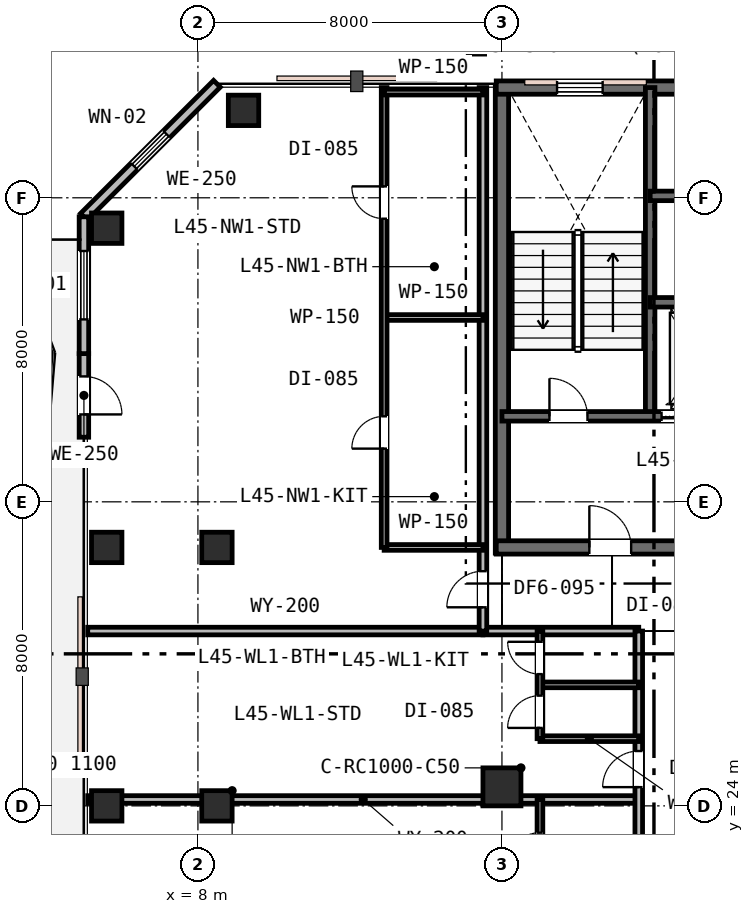
"""IFC4 building model, lengths in metres.
Left out: names, types, materials, properties, quantities, classifications, styles, units other than length and angle.
Written with IfcOpenShell. Run it as: python <this file> out.ifc"""

import sys

from ifc_helpers import new_model, si_unit, direction, frame, frame_2d, origin, origin_2d, place, context, subcontext, project, spatial, rectangle, extrude, element, fill, save


model = new_model("IFC4")
c1 = context("Model", 3, precision=1e-05, world=origin(), true_north=direction((0.0, 1.0)))
c2 = subcontext(c1, "Body", "Model", "MODEL_VIEW")
j1 = project(units=[si_unit("LENGTHUNIT", "METRE"), si_unit("PLANEANGLEUNIT", "RADIAN")], contexts=[c1])
p1 = place(None, origin())
s1 = spatial("IfcSite", under=j1, at=p1, CompositionType="ELEMENT")
p2 = place(p1, origin())
s2 = spatial("IfcBuilding", under=s1, at=p2, CompositionType="ELEMENT")
p3 = place(p2, frame((0.0, 0.0, 175.8)))
s3 = spatial("IfcBuildingStorey", under=s2, at=p3, CompositionType="ELEMENT", Elevation=175.8)
p4 = place(p3, frame((16.0, 30.65, 0.0), z_axis=(0.0, 0.0, 1.0), x_axis=(0.0, 1.0, 0.0)))
e1 = element("IfcWall", 1, at=p4, inside=s3, PredefinedType="SHEAR", context=c2, shape_type="SweptSolid", body=[
    extrude(rectangle(XDim=12.3, YDim=0.35, at=frame_2d((6.15, 0.0))), origin(), (0.0, 0.0, 1.0), 3.6),
])
p5 = place(p3, frame((15.85, 42.9, 0.0), z_axis=(0.0, 0.0, 1.0), x_axis=(1.0, 0.0, 0.0)))
e2 = element("IfcWall", 2, at=p5, inside=s3, PredefinedType="SHEAR", context=c2, shape_type="SweptSolid", body=[
    extrude(rectangle(XDim=24.3, YDim=0.35, at=frame_2d((12.15, 0.0))), origin(), (0.0, 0.0, 1.0), 3.6),
])
p6 = place(p5, frame((1.6, 0.0, 0.95)))
e3 = element("IfcOpeningElement", 3, at=p6, cuts=e2, PredefinedType="OPENING", context=c2, shape_type="SweptSolid", body=[
    extrude(rectangle(XDim=1.2, YDim=1.6, at=frame_2d((0.6, 0.8))), frame((0.0, 0.185, 0.0), z_axis=(0.0, -1.0, 0.0), x_axis=(1.0, 0.0, 0.0)), (0.0, 0.0, 1.0), 0.37),
])
p7 = place(p5, frame((16.5, 0.0, 0.95)))
e4 = element("IfcOpeningElement", 4, at=p7, cuts=e2, PredefinedType="OPENING", context=c2, shape_type="SweptSolid", body=[
    extrude(rectangle(XDim=1.2, YDim=1.6, at=frame_2d((0.6, 0.8))), frame((0.0, 0.185, 0.0), z_axis=(0.0, -1.0, 0.0), x_axis=(1.0, 0.0, 0.0)), (0.0, 0.0, 1.0), 0.37),
])
p8 = place(p5, frame((21.6, 0.0, 0.95)))
e5 = element("IfcOpeningElement", 5, at=p8, cuts=e2, PredefinedType="OPENING", context=c2, shape_type="SweptSolid", body=[
    extrude(rectangle(XDim=1.2, YDim=1.6, at=frame_2d((0.6, 0.8))), frame((0.0, 0.185, 0.0), z_axis=(0.0, -1.0, 0.0), x_axis=(1.0, 0.0, 0.0)), (0.0, 0.0, 1.0), 0.37),
])
p9 = place(p3, frame((15.85, 30.8, 0.0), z_axis=(0.0, 0.0, 1.0), x_axis=(1.0, 0.0, 0.0)))
e6 = element("IfcWall", 6, at=p9, inside=s3, PredefinedType="SHEAR", context=c2, shape_type="SweptSolid", body=[
    extrude(rectangle(XDim=11.2, YDim=0.35, at=frame_2d((5.6, 0.0))), origin(), (0.0, 0.0, 1.0), 3.6),
])
p10 = place(p9, frame((2.45, 0.0, 0.0)))
e7 = element("IfcOpeningElement", 7, at=p10, cuts=e6, PredefinedType="OPENING", context=c2, shape_type="SweptSolid", body=[
    extrude(rectangle(XDim=1.1, YDim=2.15, at=frame_2d((0.55, 1.075))), frame((0.0, 0.185, 0.0), z_axis=(0.0, -1.0, 0.0), x_axis=(1.0, 0.0, 0.0)), (0.0, 0.0, 1.0), 0.37),
])
p11 = place(p3, frame((19.9, 34.25, 0.0), z_axis=(0.0, 0.0, 1.0), x_axis=(0.0, 1.0, 0.0)))
e8 = element("IfcWall", 8, at=p11, inside=s3, PredefinedType="SHEAR", context=c2, shape_type="SweptSolid", body=[
    extrude(rectangle(XDim=8.65, YDim=0.25, at=frame_2d((4.325, 0.0))), origin(), (0.0, 0.0, 1.0), 3.6),
])
p12 = place(p3, frame((16.0, 34.25, 0.0), z_axis=(0.0, 0.0, 1.0), x_axis=(1.0, 0.0, 0.0)))
e9 = element("IfcWall", 9, at=p12, inside=s3, PredefinedType="SHEAR", context=c2, shape_type="SweptSolid", body=[
    extrude(rectangle(XDim=6.05, YDim=0.25, at=frame_2d((3.025, 0.0))), origin(), (0.0, 0.0, 1.0), 3.6),
])
p13 = place(p12, frame((1.25, 0.0, 0.0)))
e10 = element("IfcOpeningElement", 10, at=p13, cuts=e9, PredefinedType="OPENING", context=c2, shape_type="SweptSolid", body=[
    extrude(rectangle(XDim=1.0, YDim=2.15, at=frame_2d((0.5, 1.075))), frame((0.0, 0.135, 0.0), z_axis=(0.0, -1.0, 0.0), x_axis=(1.0, 0.0, 0.0)), (0.0, 0.0, 1.0), 0.27),
])
p14 = place(p12, frame((4.2, 0.0, 0.0)))
e11 = element("IfcOpeningElement", 11, at=p14, cuts=e9, PredefinedType="OPENING", context=c2, shape_type="SweptSolid", body=[
    extrude(rectangle(XDim=1.1, YDim=2.15, at=frame_2d((0.55, 1.075))), frame((0.0, 0.135, 0.0), z_axis=(0.0, -1.0, 0.0), x_axis=(1.0, 0.0, 0.0)), (0.0, 0.0, 1.0), 0.27),
])
p15 = place(p3, frame((19.9, 37.25, 0.0), z_axis=(0.0, 0.0, 1.0), x_axis=(1.0, 0.0, 0.0)))
e12 = element("IfcWall", 12, at=p15, inside=s3, PredefinedType="SHEAR", context=c2, shape_type="SweptSolid", body=[
    extrude(rectangle(XDim=16.2, YDim=0.25, at=frame_2d((8.1, 0.0))), origin(), (0.0, 0.0, 1.0), 3.6),
])
p16 = place(p15, frame((12.55, 0.0, 0.0)))
e13 = element("IfcOpeningElement", 13, at=p16, cuts=e12, PredefinedType="OPENING", context=c2, shape_type="SweptSolid", body=[
    extrude(rectangle(XDim=0.9, YDim=2.15, at=frame_2d((0.45, 1.075))), frame((0.0, 0.135, 0.0), z_axis=(0.0, -1.0, 0.0), x_axis=(1.0, 0.0, 0.0)), (0.0, 0.0, 1.0), 0.27),
])
p17 = place(p15, frame((2.5, 0.0, 0.0)))
e14 = element("IfcOpeningElement", 14, at=p17, cuts=e12, PredefinedType="OPENING", context=c2, shape_type="SweptSolid", body=[
    extrude(rectangle(XDim=1.05, YDim=2.15, at=frame_2d((0.525, 1.075))), frame((0.0, 0.135, 0.0), z_axis=(0.0, -1.0, 0.0), x_axis=(1.0, 0.0, 0.0)), (0.0, 0.0, 1.0), 0.27),
])
p18 = place(p15, frame((4.4, 0.0, 0.0)))
e15 = element("IfcOpeningElement", 15, at=p18, cuts=e12, PredefinedType="OPENING", context=c2, shape_type="SweptSolid", body=[
    extrude(rectangle(XDim=1.05, YDim=2.15, at=frame_2d((0.525, 1.075))), frame((0.0, 0.135, 0.0), z_axis=(0.0, -1.0, 0.0), x_axis=(1.0, 0.0, 0.0)), (0.0, 0.0, 1.0), 0.27),
])
p19 = place(p15, frame((6.3, 0.0, 0.0)))
e16 = element("IfcOpeningElement", 16, at=p19, cuts=e12, PredefinedType="OPENING", context=c2, shape_type="SweptSolid", body=[
    extrude(rectangle(XDim=1.05, YDim=2.15, at=frame_2d((0.525, 1.075))), frame((0.0, 0.135, 0.0), z_axis=(0.0, -1.0, 0.0), x_axis=(1.0, 0.0, 0.0)), (0.0, 0.0, 1.0), 0.27),
])
p20 = place(p3, frame((19.9, 40.05, 0.0), z_axis=(0.0, 0.0, 1.0), x_axis=(1.0, 0.0, 0.0)))
e17 = element("IfcWall", 17, at=p20, inside=s3, PredefinedType="SHEAR", context=c2, shape_type="SweptSolid", body=[
    extrude(rectangle(XDim=12.05, YDim=0.25, at=frame_2d((6.025, 0.0))), origin(), (0.0, 0.0, 1.0), 3.6),
])
p21 = place(p3, frame((8.5, 24.0, 0.0), z_axis=(0.0, 0.0, 1.0), x_axis=(1.0, 0.0, 0.0)))
e18 = element("IfcColumn", 18, at=p21, inside=s3, PredefinedType="COLUMN", context=c2, shape_type="SweptSolid", body=[
    extrude(rectangle(XDim=0.8, YDim=0.8, at=origin_2d()), origin(), (0.0, 0.0, 1.0), 3.6),
])
p22 = place(p3, frame((16.0, 24.5, 0.0), z_axis=(0.0, 0.0, 1.0), x_axis=(1.0, 0.0, 0.0)))
e19 = element("IfcColumn", 19, at=p22, inside=s3, PredefinedType="COLUMN", context=c2, shape_type="SweptSolid", body=[
    extrude(rectangle(XDim=1.0, YDim=1.0, at=origin_2d()), origin(), (0.0, 0.0, 1.0), 3.6),
])
for number, where, z_axis, x_axis in (
    (20, (5.6, 24.0, 0.0), (0.0, 0.0, 1.0), (1.0, 0.0, 0.0)),
    (21, (5.6, 30.8, 0.0), (0.0, 0.0, 1.0), (1.0, 0.0, 0.0)),
    (22, (5.6, 39.2, 0.0), (0.0, 0.0, 1.0), (1.0, 0.0, 0.0)),
    (23, (8.5, 30.8, 0.0), (0.0, 0.0, 1.0), (1.0, 0.0, 0.0)),
    (24, (9.2, 42.3, 0.0), (0.0, 0.0, 1.0), (1.0, 0.0, 0.0)),
):
    element("IfcColumn", number, at=place(p3, frame(where, z_axis=z_axis, x_axis=x_axis)), inside=s3, PredefinedType="COLUMN", context=c2, shape_type="SweptSolid", body=[
        extrude(rectangle(XDim=0.8, YDim=0.8, at=origin_2d()), origin(), (0.0, 0.0, 1.0), 3.6),
    ])
p23 = place(p3, frame((8.5, 43.0, 0.0), z_axis=(0.0, 0.0, 1.0), x_axis=(-0.707106781187, -0.707106781187, 0.0)))
e25 = element("IfcWall", 25, at=p23, inside=s3, PredefinedType="STANDARD", context=c2, shape_type="SweptSolid", body=[
    extrude(rectangle(XDim=4.95, YDim=0.25, at=frame_2d((2.475, 0.0))), origin(), (0.0, 0.0, 1.0), 3.33),
])
p24 = place(p23, frame((1.875, 0.0, 0.85)))
e26 = element("IfcOpeningElement", 26, at=p24, cuts=e25, PredefinedType="OPENING", context=c2, shape_type="SweptSolid", body=[
    extrude(rectangle(XDim=1.2, YDim=1.6, at=frame_2d((0.6, 0.8))), frame((0.0, 0.135, 0.0), z_axis=(0.0, -1.0, 0.0), x_axis=(1.0, 0.0, 0.0)), (0.0, 0.0, 1.0), 0.27),
])
p25 = place(p3, frame((5.0, 35.9, 0.0), z_axis=(0.0, 0.0, 1.0), x_axis=(0.0, -1.0, 0.0)))
e27 = element("IfcWall", 27, at=p25, inside=s3, PredefinedType="STANDARD", context=c2, shape_type="SweptSolid", body=[
    extrude(rectangle(XDim=2.2, YDim=0.25, at=frame_2d((1.1, 0.0))), origin(), (0.0, 0.0, 1.0), 3.33),
])
p26 = place(p25, frame((0.6, 0.0, 0.0)))
e28 = element("IfcOpeningElement", 28, at=p26, cuts=e27, PredefinedType="OPENING", context=c2, shape_type="SweptSolid", body=[
    extrude(rectangle(XDim=1.0, YDim=2.15, at=frame_2d((0.5, 1.075))), frame((0.0, 0.135, 0.0), z_axis=(0.0, -1.0, 0.0), x_axis=(1.0, 0.0, 0.0)), (0.0, 0.0, 1.0), 0.27),
])
p27 = place(p3, frame((5.0, 39.5, 0.0), z_axis=(0.0, 0.0, 1.0), x_axis=(0.0, -1.0, 0.0)))
e29 = element("IfcWall", 29, at=p27, inside=s3, PredefinedType="STANDARD", context=c2, shape_type="SweptSolid", body=[
    extrude(rectangle(XDim=3.6, YDim=0.25, at=frame_2d((1.8, 0.0))), origin(), (0.0, 0.0, 1.0), 3.33),
])
p28 = place(p27, frame((0.9, 0.0, 0.75)))
e30 = element("IfcOpeningElement", 30, at=p28, cuts=e29, PredefinedType="OPENING", context=c2, shape_type="SweptSolid", body=[
    extrude(rectangle(XDim=1.8, YDim=1.85, at=frame_2d((0.9, 0.925))), frame((0.0, 0.135, 0.0), z_axis=(0.0, -1.0, 0.0), x_axis=(1.0, 0.0, 0.0)), (0.0, 0.0, 1.0), 0.27),
])
p29 = place(p3, frame((5.1, 28.6, 0.0), z_axis=(0.0, 0.0, 1.0), x_axis=(1.0, 0.0, 0.0)))
e31 = element("IfcWall", 31, at=p29, inside=s3, PredefinedType="PARTITIONING", context=c2, shape_type="SweptSolid", body=[
    extrude(rectangle(XDim=10.4, YDim=0.2, at=frame_2d((5.2, 0.0))), origin(), (0.0, 0.0, 1.0), 2.92),
])
p30 = place(p3, frame((15.5, 28.6, 0.0), z_axis=(0.0, 0.0, 1.0), x_axis=(1.0, 0.0, 0.0)))
e32 = element("IfcWall", 32, at=p30, inside=s3, PredefinedType="PARTITIONING", context=c2, shape_type="SweptSolid", body=[
    extrude(rectangle(XDim=4.1, YDim=0.2, at=frame_2d((2.05, 0.0))), origin(), (0.0, 0.0, 1.0), 2.92),
])
p31 = place(p3, frame((15.5, 28.6, 0.0), z_axis=(0.0, 0.0, 1.0), x_axis=(0.0, 1.0, 0.0)))
e33 = element("IfcWall", 33, at=p31, inside=s3, PredefinedType="PARTITIONING", context=c2, shape_type="SweptSolid", body=[
    extrude(rectangle(XDim=14.3, YDim=0.2, at=frame_2d((7.15, 0.0))), origin(), (0.0, 0.0, 1.0), 2.92),
])
p32 = place(p31, frame((0.625, 0.0, 0.0)))
e34 = element("IfcOpeningElement", 34, at=p32, cuts=e33, PredefinedType="OPENING", context=c2, shape_type="SweptSolid", body=[
    extrude(rectangle(XDim=0.95, YDim=2.15, at=frame_2d((0.475, 1.075))), frame((0.0, 0.11, 0.0), z_axis=(0.0, -1.0, 0.0), x_axis=(1.0, 0.0, 0.0)), (0.0, 0.0, 1.0), 0.22),
])
p33 = place(p3, frame((12.9, 30.8, 0.0), z_axis=(0.0, 0.0, 1.0), x_axis=(1.0, 0.0, 0.0)))
e35 = element("IfcWall", 35, at=p33, inside=s3, PredefinedType="PARTITIONING", context=c2, shape_type="SweptSolid", body=[
    extrude(rectangle(XDim=2.6, YDim=0.15, at=frame_2d((1.3, 0.0))), origin(), (0.0, 0.0, 1.0), 2.92),
])
p34 = place(p3, frame((12.9, 36.85, 0.0), z_axis=(0.0, 0.0, 1.0), x_axis=(1.0, 0.0, 0.0)))
e36 = element("IfcWall", 36, at=p34, inside=s3, PredefinedType="PARTITIONING", context=c2, shape_type="SweptSolid", body=[
    extrude(rectangle(XDim=2.6, YDim=0.15, at=frame_2d((1.3, 0.0))), origin(), (0.0, 0.0, 1.0), 3.33),
])
p35 = place(p3, frame((12.9, 30.8, 0.0), z_axis=(0.0, 0.0, 1.0), x_axis=(0.0, 1.0, 0.0)))
e37 = element("IfcWall", 37, at=p35, inside=s3, PredefinedType="PARTITIONING", context=c2, shape_type="SweptSolid", body=[
    extrude(rectangle(XDim=12.1, YDim=0.15, at=frame_2d((6.05, 0.0))), origin(), (0.0, 0.0, 1.0), 2.92),
])
p36 = place(p35, frame((2.6, 0.0, 0.0)))
e38 = element("IfcOpeningElement", 38, at=p36, cuts=e37, PredefinedType="OPENING", context=c2, shape_type="SweptSolid", body=[
    extrude(rectangle(XDim=0.85, YDim=2.15, at=frame_2d((0.425, 1.075))), frame((0.0, 0.085, 0.0), z_axis=(0.0, -1.0, 0.0), x_axis=(1.0, 0.0, 0.0)), (0.0, 0.0, 1.0), 0.17),
])
p37 = place(p35, frame((8.65, 0.0, 0.0)))
e39 = element("IfcOpeningElement", 39, at=p37, cuts=e37, PredefinedType="OPENING", context=c2, shape_type="SweptSolid", body=[
    extrude(rectangle(XDim=0.85, YDim=2.15, at=frame_2d((0.425, 1.075))), frame((0.0, 0.085, 0.0), z_axis=(0.0, -1.0, 0.0), x_axis=(1.0, 0.0, 0.0)), (0.0, 0.0, 1.0), 0.17),
])
p38 = place(p3, frame((12.9, 42.78, 0.0), z_axis=(0.0, 0.0, 1.0), x_axis=(1.0, 0.0, 0.0)))
e40 = element("IfcWall", 40, at=p38, inside=s3, PredefinedType="PARTITIONING", context=c2, shape_type="SweptSolid", body=[
    extrude(rectangle(XDim=2.6, YDim=0.15, at=frame_2d((1.3, 0.0))), origin(), (0.0, 0.0, 1.0), 3.33),
])
p39 = place(p3, frame((5.1, 24.168, 0.0), z_axis=(0.0, 0.0, 1.0), x_axis=(1.0, 0.0, 0.0)))
e41 = element("IfcWall", 41, at=p39, inside=s3, PredefinedType="PARTITIONING", context=c2, shape_type="SweptSolid", body=[
    extrude(rectangle(XDim=14.5, YDim=0.2, at=frame_2d((7.25, 0.0))), origin(), (0.0, 0.0, 1.0), 2.92),
])
p40 = place(p3, frame((19.6, 17.0, 0.0), z_axis=(0.0, 0.0, 1.0), x_axis=(0.0, 1.0, 0.0)))
e42 = element("IfcWall", 42, at=p40, inside=s3, PredefinedType="PARTITIONING", context=c2, shape_type="SweptSolid", body=[
    extrude(rectangle(XDim=11.6, YDim=0.2, at=frame_2d((5.8, 0.0))), origin(), (0.0, 0.0, 1.0), 2.92),
])
p41 = place(p40, frame((7.493, 0.0, 0.0)))
e43 = element("IfcOpeningElement", 43, at=p41, cuts=e42, PredefinedType="OPENING", context=c2, shape_type="SweptSolid", body=[
    extrude(rectangle(XDim=0.95, YDim=2.15, at=frame_2d((0.475, 1.075))), frame((0.0, 0.11, 0.0), z_axis=(0.0, -1.0, 0.0), x_axis=(1.0, 0.0, 0.0)), (0.0, 0.0, 1.0), 0.22),
])
p42 = place(p40, frame((0.909, 0.0, 0.0)))
e44 = element("IfcOpeningElement", 44, at=p42, cuts=e42, PredefinedType="OPENING", context=c2, shape_type="SweptSolid", body=[
    extrude(rectangle(XDim=0.95, YDim=2.15, at=frame_2d((0.475, 1.075))), frame((0.0, 0.11, 0.0), z_axis=(0.0, -1.0, 0.0), x_axis=(1.0, 0.0, 0.0)), (0.0, 0.0, 1.0), 0.22),
])
for number, where, z_axis, x_axis in (
    (45, (17.0, 25.768, 0.0), (0.0, 0.0, 1.0), (1.0, 0.0, 0.0)),
    (46, (17.0, 27.184, 0.0), (0.0, 0.0, 1.0), (1.0, 0.0, 0.0)),
):
    element("IfcWall", number, at=place(p3, frame(where, z_axis=z_axis, x_axis=x_axis)), inside=s3, PredefinedType="PARTITIONING", context=c2, shape_type="SweptSolid", body=[
        extrude(rectangle(XDim=2.6, YDim=0.15, at=frame_2d((1.3, 0.0))), origin(), (0.0, 0.0, 1.0), 3.07),
    ])
p43 = place(p3, frame((17.0, 25.768, 0.0), z_axis=(0.0, 0.0, 1.0), x_axis=(0.0, 1.0, 0.0)))
e47 = element("IfcWall", 47, at=p43, inside=s3, PredefinedType="PARTITIONING", context=c2, shape_type="SweptSolid", body=[
    extrude(rectangle(XDim=2.832, YDim=0.15, at=frame_2d((1.416, 0.0))), origin(), (0.0, 0.0, 1.0), 3.33),
])
p44 = place(p43, frame((0.283, 0.0, 0.0)))
e48 = element("IfcOpeningElement", 48, at=p44, cuts=e47, PredefinedType="OPENING", context=c2, shape_type="SweptSolid", body=[
    extrude(rectangle(XDim=0.85, YDim=2.15, at=frame_2d((0.425, 1.075))), frame((0.0, 0.085, 0.0), z_axis=(0.0, -1.0, 0.0), x_axis=(1.0, 0.0, 0.0)), (0.0, 0.0, 1.0), 0.17),
])
p45 = place(p43, frame((1.699, 0.0, 0.0)))
e49 = element("IfcOpeningElement", 49, at=p45, cuts=e47, PredefinedType="OPENING", context=c2, shape_type="SweptSolid", body=[
    extrude(rectangle(XDim=0.85, YDim=2.15, at=frame_2d((0.425, 1.075))), frame((0.0, 0.085, 0.0), z_axis=(0.0, -1.0, 0.0), x_axis=(1.0, 0.0, 0.0)), (0.0, 0.0, 1.0), 0.17),
])
p46 = place(p3, frame((17.0, 19.768, 0.0), z_axis=(0.0, 0.0, 1.0), x_axis=(0.0, 1.0, 0.0)))
e50 = element("IfcWall", 50, at=p46, inside=s3, PredefinedType="PARTITIONING", context=c2, shape_type="SweptSolid", body=[
    extrude(rectangle(XDim=4.4, YDim=0.15, at=frame_2d((2.2, 0.0))), origin(), (0.0, 0.0, 1.0), 2.92),
])
p47 = place(p46, frame((0.675, 0.0, 0.0)))
e51 = element("IfcOpeningElement", 51, at=p47, cuts=e50, PredefinedType="OPENING", context=c2, shape_type="SweptSolid", body=[
    extrude(rectangle(XDim=0.85, YDim=2.15, at=frame_2d((0.425, 1.075))), frame((0.0, 0.085, 0.0), z_axis=(0.0, -1.0, 0.0), x_axis=(1.0, 0.0, 0.0)), (0.0, 0.0, 1.0), 0.17),
])
p48 = place(p46, frame((2.677, 0.0, 0.0)))
e52 = element("IfcOpeningElement", 52, at=p48, cuts=e50, PredefinedType="OPENING", context=c2, shape_type="SweptSolid", body=[
    extrude(rectangle(XDim=0.85, YDim=2.15, at=frame_2d((0.425, 1.075))), frame((0.0, 0.085, 0.0), z_axis=(0.0, -1.0, 0.0), x_axis=(1.0, 0.0, 0.0)), (0.0, 0.0, 1.0), 0.17),
])
p49 = place(p6, origin())
e53 = element("IfcWindow", 53, at=p49, inside=s3, PartitioningType="SINGLE_PANEL", PredefinedType="WINDOW", context=c2, shape_type="SweptSolid", body=[
    extrude(rectangle(XDim=1.2, YDim=1.6, at=frame_2d((0.6, 0.8))), frame((0.0, 0.03, 0.0), z_axis=(0.0, -1.0, 0.0), x_axis=(1.0, 0.0, 0.0)), (0.0, 0.0, 1.0), 0.06),
])
fill(e3, e53)
p50 = place(p24, origin())
e54 = element("IfcWindow", 54, at=p50, inside=s3, PartitioningType="SINGLE_PANEL", PredefinedType="WINDOW", context=c2, shape_type="SweptSolid", body=[
    extrude(rectangle(XDim=1.2, YDim=1.6, at=frame_2d((0.6, 0.8))), frame((0.0, 0.03, 0.0), z_axis=(0.0, -1.0, 0.0), x_axis=(1.0, 0.0, 0.0)), (0.0, 0.0, 1.0), 0.06),
])
fill(e26, e54)
p51 = place(p26, origin())
e55 = element("IfcDoor", 55, at=p51, inside=s3, OperationType="SINGLE_SWING_RIGHT", PredefinedType="DOOR", context=c2, shape_type="SweptSolid", body=[
    extrude(rectangle(XDim=1.0, YDim=2.15, at=frame_2d((0.5, 1.075))), frame((0.0, 0.025, 0.0), z_axis=(0.0, -1.0, 0.0), x_axis=(1.0, 0.0, 0.0)), (0.0, 0.0, 1.0), 0.05),
])
fill(e28, e55)
p52 = place(p28, origin())
e56 = element("IfcWindow", 56, at=p52, inside=s3, PartitioningType="SINGLE_PANEL", PredefinedType="WINDOW", context=c2, shape_type="SweptSolid", body=[
    extrude(rectangle(XDim=1.8, YDim=1.85, at=frame_2d((0.9, 0.925))), frame((0.0, 0.03, 0.0), z_axis=(0.0, -1.0, 0.0), x_axis=(1.0, 0.0, 0.0)), (0.0, 0.0, 1.0), 0.06),
])
fill(e30, e56)
p53 = place(p13, origin())
e57 = element("IfcDoor", 57, at=p53, inside=s3, OperationType="SINGLE_SWING_LEFT", PredefinedType="DOOR", context=c2, shape_type="SweptSolid", body=[
    extrude(rectangle(XDim=1.0, YDim=2.15, at=frame_2d((0.5, 1.075))), frame((0.0, 0.025, 0.0), z_axis=(0.0, -1.0, 0.0), x_axis=(1.0, 0.0, 0.0)), (0.0, 0.0, 1.0), 0.05),
])
fill(e10, e57)
p54 = place(p10, origin())
e58 = element("IfcDoor", 58, at=p54, inside=s3, OperationType="SINGLE_SWING_LEFT", PredefinedType="DOOR", context=c2, shape_type="SweptSolid", body=[
    extrude(rectangle(XDim=1.1, YDim=2.15, at=frame_2d((0.55, 1.075))), frame((0.0, 0.025, 0.0), z_axis=(0.0, -1.0, 0.0), x_axis=(1.0, 0.0, 0.0)), (0.0, 0.0, 1.0), 0.05),
])
fill(e7, e58)
p55 = place(p32, origin())
e59 = element("IfcDoor", 59, at=p55, inside=s3, OperationType="SINGLE_SWING_LEFT", PredefinedType="DOOR", context=c2, shape_type="SweptSolid", body=[
    extrude(rectangle(XDim=0.95, YDim=2.15, at=frame_2d((0.475, 1.075))), frame((0.0, 0.025, 0.0), z_axis=(0.0, -1.0, 0.0), x_axis=(1.0, 0.0, 0.0)), (0.0, 0.0, 1.0), 0.05),
])
fill(e34, e59)
p56 = place(p36, origin())
e60 = element("IfcDoor", 60, at=p56, inside=s3, OperationType="SINGLE_SWING_LEFT", PredefinedType="DOOR", context=c2, shape_type="SweptSolid", body=[
    extrude(rectangle(XDim=0.85, YDim=2.15, at=frame_2d((0.425, 1.075))), frame((0.0, 0.025, 0.0), z_axis=(0.0, -1.0, 0.0), x_axis=(1.0, 0.0, 0.0)), (0.0, 0.0, 1.0), 0.05),
])
fill(e38, e60)
p57 = place(p37, origin())
e61 = element("IfcDoor", 61, at=p57, inside=s3, OperationType="SINGLE_SWING_RIGHT", PredefinedType="DOOR", context=c2, shape_type="SweptSolid", body=[
    extrude(rectangle(XDim=0.85, YDim=2.15, at=frame_2d((0.425, 1.075))), frame((0.0, 0.025, 0.0), z_axis=(0.0, -1.0, 0.0), x_axis=(1.0, 0.0, 0.0)), (0.0, 0.0, 1.0), 0.05),
])
fill(e39, e61)
p58 = place(p41, origin())
e62 = element("IfcDoor", 62, at=p58, inside=s3, OperationType="SINGLE_SWING_LEFT", PredefinedType="DOOR", context=c2, shape_type="SweptSolid", body=[
    extrude(rectangle(XDim=0.95, YDim=2.15, at=frame_2d((0.475, 1.075))), frame((0.0, 0.025, 0.0), z_axis=(0.0, -1.0, 0.0), x_axis=(1.0, 0.0, 0.0)), (0.0, 0.0, 1.0), 0.05),
])
fill(e43, e62)
p59 = place(p44, origin())
e63 = element("IfcDoor", 63, at=p59, inside=s3, OperationType="SINGLE_SWING_LEFT", PredefinedType="DOOR", context=c2, shape_type="SweptSolid", body=[
    extrude(rectangle(XDim=0.85, YDim=2.15, at=frame_2d((0.425, 1.075))), frame((0.0, 0.025, 0.0), z_axis=(0.0, -1.0, 0.0), x_axis=(1.0, 0.0, 0.0)), (0.0, 0.0, 1.0), 0.05),
])
fill(e48, e63)
p60 = place(p45, origin())
e64 = element("IfcDoor", 64, at=p60, inside=s3, OperationType="SINGLE_SWING_RIGHT", PredefinedType="DOOR", context=c2, shape_type="SweptSolid", body=[
    extrude(rectangle(XDim=0.85, YDim=2.15, at=frame_2d((0.425, 1.075))), frame((0.0, 0.025, 0.0), z_axis=(0.0, -1.0, 0.0), x_axis=(1.0, 0.0, 0.0)), (0.0, 0.0, 1.0), 0.05),
])
fill(e49, e64)
p61 = place(p48, origin())
e65 = element("IfcDoor", 65, at=p61, inside=s3, OperationType="SINGLE_SWING_LEFT", PredefinedType="DOOR", context=c2, shape_type="SweptSolid", body=[
    extrude(rectangle(XDim=0.85, YDim=2.15, at=frame_2d((0.425, 1.075))), frame((0.0, 0.025, 0.0), z_axis=(0.0, -1.0, 0.0), x_axis=(1.0, 0.0, 0.0)), (0.0, 0.0, 1.0), 0.05),
])
fill(e52, e65)
p62 = place(p14, origin())
e66 = element("IfcDoor", 66, at=p62, inside=s3, OperationType="DOUBLE_DOOR_SLIDING", PredefinedType="DOOR", context=c2, shape_type="SweptSolid", body=[
    extrude(rectangle(XDim=1.1, YDim=2.15, at=frame_2d((0.55, 1.075))), frame((0.0, 0.025, 0.0), z_axis=(0.0, -1.0, 0.0), x_axis=(1.0, 0.0, 0.0)), (0.0, 0.0, 1.0), 0.05),
])
fill(e11, e66)
save(model, sys.argv[1])
